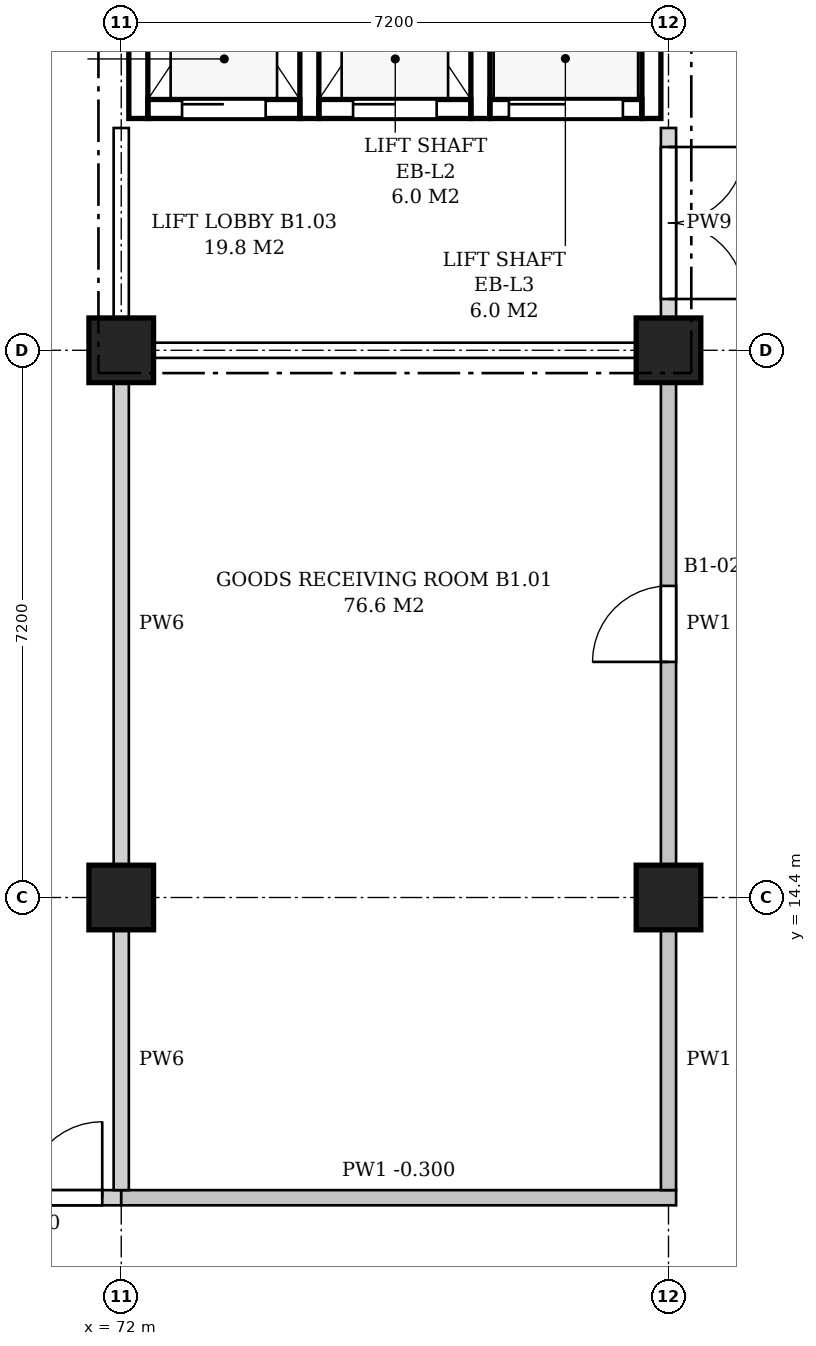
"""IFC4 building model, lengths in metres.
Left out: names, types, materials, properties, quantities, classifications, styles, units other than length and angle.
Written with IfcOpenShell. Run it as: python <this file> out.ifc"""

import sys

from ifc_helpers import new_model, si_unit, direction, frame, frame_2d, origin, origin_2d, place, context, subcontext, project, spatial, polyline, rectangle, outline, extrude, element, fill, save


model = new_model("IFC4")
c1 = context("Model", 3, precision=1e-05, world=origin(), true_north=direction((0.0, 1.0)))
c2 = subcontext(c1, "Body", "Model", "MODEL_VIEW")
j1 = project(units=[si_unit("LENGTHUNIT", "METRE"), si_unit("PLANEANGLEUNIT", "RADIAN")], contexts=[c1])
p1 = place(None, origin())
s1 = spatial("IfcSite", under=j1, at=p1, CompositionType="ELEMENT")
p2 = place(p1, origin())
s2 = spatial("IfcBuilding", under=s1, at=p2, CompositionType="ELEMENT")
p3 = place(p2, frame((0.0, 0.0, -4.5)))
s3 = spatial("IfcBuildingStorey", under=s2, at=p3, CompositionType="ELEMENT", Elevation=-4.5)
for number, where, z_axis, x_axis in (
    (1, (72.0, 14.4, 0.0), (0.0, 0.0, 1.0), (1.0, 0.0, 0.0)),
    (2, (72.0, 21.6, 0.0), (0.0, 0.0, 1.0), (1.0, 0.0, 0.0)),
    (3, (79.2, 14.4, 0.0), (0.0, 0.0, 1.0), (1.0, 0.0, 0.0)),
    (4, (79.2, 21.6, 0.0), (0.0, 0.0, 1.0), (1.0, 0.0, 0.0)),
):
    element("IfcColumn", number, at=place(p3, frame(where, z_axis=z_axis, x_axis=x_axis)), inside=s3, PredefinedType="COLUMN", context=c2, shape_type="SweptSolid", body=[
        extrude(rectangle(XDim=0.85, YDim=0.85, at=origin_2d()), origin(), (0.0, 0.0, 1.0), 4.5),
    ])
p4 = place(p3, frame((72.225, 24.65, -1.6), z_axis=(0.0, 0.0, 1.0), x_axis=(0.0, 1.0, 0.0)))
e5 = element("IfcWall", 5, at=p4, inside=s3, PredefinedType="SHEAR", context=c2, shape_type="SweptSolid", body=[
    extrude(rectangle(XDim=3.725, YDim=0.25, at=frame_2d((1.863, 0.0))), origin(), (0.0, 0.0, 1.0), 5.0),
])
for number, where, z_axis, x_axis in (
    (6, (74.475, 24.65, -1.6), (0.0, 0.0, 1.0), (0.0, 1.0, 0.0)),
    (7, (76.725, 24.65, -1.6), (0.0, 0.0, 1.0), (0.0, 1.0, 0.0)),
):
    element("IfcWall", number, at=place(p3, frame(where, z_axis=z_axis, x_axis=x_axis)), inside=s3, PredefinedType="SHEAR", context=c2, shape_type="SweptSolid", body=[
        extrude(rectangle(XDim=3.5, YDim=0.25, at=frame_2d((1.75, 0.0))), origin(), (0.0, 0.0, 1.0), 5.8),
    ])
p5 = place(p3, frame((78.975, 24.65, -1.6), z_axis=(0.0, 0.0, 1.0), x_axis=(0.0, 1.0, 0.0)))
e8 = element("IfcWall", 8, at=p5, inside=s3, PredefinedType="SHEAR", context=c2, shape_type="SweptSolid", body=[
    extrude(rectangle(XDim=3.725, YDim=0.25, at=frame_2d((1.863, 0.0))), origin(), (0.0, 0.0, 1.0), 5.0),
])
p6 = place(p3, frame((72.35, 24.775, 0.0), z_axis=(0.0, 0.0, 1.0), x_axis=(1.0, 0.0, 0.0)))
e9 = element("IfcWall", 9, at=p6, inside=s3, PredefinedType="SHEAR", context=c2, shape_type="SweptSolid", body=[
    extrude(rectangle(XDim=2.0, YDim=0.25, at=frame_2d((1.0, 0.0))), origin(), (0.0, 0.0, 1.0), 4.2),
])
p7 = place(p6, frame((0.45, 0.0, 0.0)))
e10 = element("IfcOpeningElement", 10, at=p7, cuts=e9, PredefinedType="OPENING", context=c2, shape_type="SweptSolid", body=[
    extrude(rectangle(XDim=1.1, YDim=2.1, at=frame_2d((0.55, 1.05))), frame((0.0, 0.135, 0.0), z_axis=(0.0, -1.0, 0.0), x_axis=(1.0, 0.0, 0.0)), (0.0, 0.0, 1.0), 0.27),
])
p8 = place(p3, frame((74.6, 24.775, 0.0), z_axis=(0.0, 0.0, 1.0), x_axis=(1.0, 0.0, 0.0)))
e11 = element("IfcWall", 11, at=p8, inside=s3, PredefinedType="SHEAR", context=c2, shape_type="SweptSolid", body=[
    extrude(rectangle(XDim=2.0, YDim=0.25, at=frame_2d((1.0, 0.0))), origin(), (0.0, 0.0, 1.0), 4.2),
])
p9 = place(p8, frame((0.45, 0.0, 0.0)))
e12 = element("IfcOpeningElement", 12, at=p9, cuts=e11, PredefinedType="OPENING", context=c2, shape_type="SweptSolid", body=[
    extrude(rectangle(XDim=1.1, YDim=2.1, at=frame_2d((0.55, 1.05))), frame((0.0, 0.135, 0.0), z_axis=(0.0, -1.0, 0.0), x_axis=(1.0, 0.0, 0.0)), (0.0, 0.0, 1.0), 0.27),
])
p10 = place(p3, frame((76.85, 24.775, 0.0), z_axis=(0.0, 0.0, 1.0), x_axis=(1.0, 0.0, 0.0)))
e13 = element("IfcWall", 13, at=p10, inside=s3, PredefinedType="SHEAR", context=c2, shape_type="SweptSolid", body=[
    extrude(rectangle(XDim=2.0, YDim=0.25, at=frame_2d((1.0, 0.0))), origin(), (0.0, 0.0, 1.0), 4.2),
])
p11 = place(p10, frame((0.25, 0.0, 0.0)))
e14 = element("IfcOpeningElement", 14, at=p11, cuts=e13, PredefinedType="OPENING", context=c2, shape_type="SweptSolid", body=[
    extrude(rectangle(XDim=1.5, YDim=2.1, at=frame_2d((0.75, 1.05))), frame((0.0, 0.135, 0.0), z_axis=(0.0, -1.0, 0.0), x_axis=(1.0, 0.0, 0.0)), (0.0, 0.0, 1.0), 0.27),
])
p12 = place(p3, frame((64.8, 10.45, 0.0), z_axis=(0.0, 0.0, 1.0), x_axis=(1.0, 0.0, 0.0)))
e15 = element("IfcWall", 15, at=p12, inside=s3, PredefinedType="PARTITIONING", context=c2, shape_type="SweptSolid", body=[
    extrude(outline(polyline([(0.0, 0.0), (7.2, 0.0), (7.2, 3.4), (6.9, 3.4), (6.9, 4.2), (0.3, 4.2), (0.3, 3.4), (0.0, 3.4), (0.0, 0.0)])), frame((0.0, 0.1, 0.0), z_axis=(0.0, -1.0, 0.0), x_axis=(1.0, 0.0, 0.0)), (0.0, 0.0, 1.0), 0.2),
])
p13 = place(p12, frame((2.6, 0.0, 0.0)))
e16 = element("IfcOpeningElement", 16, at=p13, cuts=e15, PredefinedType="OPENING", context=c2, shape_type="SweptSolid", body=[
    extrude(rectangle(XDim=2.0, YDim=2.1, at=frame_2d((1.0, 1.05))), frame((0.0, 0.11, 0.0), z_axis=(0.0, -1.0, 0.0), x_axis=(1.0, 0.0, 0.0)), (0.0, 0.0, 1.0), 0.22),
])
p14 = place(p12, frame((4.95, 0.0, 0.0)))
e17 = element("IfcOpeningElement", 17, at=p14, cuts=e15, PredefinedType="OPENING", context=c2, shape_type="SweptSolid", body=[
    extrude(rectangle(XDim=2.0, YDim=2.1, at=frame_2d((1.0, 1.05))), frame((0.0, 0.11, 0.0), z_axis=(0.0, -1.0, 0.0), x_axis=(1.0, 0.0, 0.0)), (0.0, 0.0, 1.0), 0.22),
])
p15 = place(p3, frame((72.0, 10.45, 0.0), z_axis=(0.0, 0.0, 1.0), x_axis=(1.0, 0.0, 0.0)))
e18 = element("IfcWall", 18, at=p15, inside=s3, PredefinedType="PARTITIONING", context=c2, shape_type="SweptSolid", body=[
    extrude(outline(polyline([(0.0, 0.0), (7.3, 0.0), (7.3, 3.4), (6.9, 3.4), (6.9, 4.2), (0.3, 4.2), (0.3, 3.4), (0.0, 3.4), (0.0, 0.0)])), frame((0.0, 0.1, 0.0), z_axis=(0.0, -1.0, 0.0), x_axis=(1.0, 0.0, 0.0)), (0.0, 0.0, 1.0), 0.2),
])
p16 = place(p3, frame((72.425, 21.6, 0.0), z_axis=(0.0, 0.0, 1.0), x_axis=(1.0, 0.0, 0.0)))
e19 = element("IfcWall", 19, at=p16, inside=s3, PredefinedType="PARTITIONING", context=c2, shape_type="SweptSolid", body=[
    extrude(rectangle(XDim=6.35, YDim=0.2, at=frame_2d((3.175, 0.0))), origin(), (0.0, 0.0, 1.0), 3.4),
])
p17 = place(p3, frame((72.0, 10.55, 0.0), z_axis=(0.0, 0.0, 1.0), x_axis=(0.0, 1.0, 0.0)))
e20 = element("IfcWall", 20, at=p17, inside=s3, PredefinedType="PARTITIONING", context=c2, shape_type="SweptSolid", body=[
    extrude(rectangle(XDim=3.425, YDim=0.2, at=frame_2d((1.712, 0.0))), origin(), (0.0, 0.0, 1.0), 3.4),
])
p18 = place(p3, frame((72.0, 14.825, 0.0), z_axis=(0.0, 0.0, 1.0), x_axis=(0.0, 1.0, 0.0)))
e21 = element("IfcWall", 21, at=p18, inside=s3, PredefinedType="PARTITIONING", context=c2, shape_type="SweptSolid", body=[
    extrude(rectangle(XDim=6.35, YDim=0.2, at=frame_2d((3.175, 0.0))), origin(), (0.0, 0.0, 1.0), 3.4),
])
p19 = place(p3, frame((72.0, 22.025, 0.0), z_axis=(0.0, 0.0, 1.0), x_axis=(0.0, 1.0, 0.0)))
e22 = element("IfcWall", 22, at=p19, inside=s3, PredefinedType="PARTITIONING", context=c2, shape_type="SweptSolid", body=[
    extrude(rectangle(XDim=2.5, YDim=0.2, at=frame_2d((1.25, 0.0))), origin(), (0.0, 0.0, 1.0), 3.4),
])
p20 = place(p3, frame((79.2, 10.55, 0.0), z_axis=(0.0, 0.0, 1.0), x_axis=(0.0, 1.0, 0.0)))
e23 = element("IfcWall", 23, at=p20, inside=s3, PredefinedType="PARTITIONING", context=c2, shape_type="SweptSolid", body=[
    extrude(rectangle(XDim=3.425, YDim=0.2, at=frame_2d((1.712, 0.0))), origin(), (0.0, 0.0, 1.0), 3.4),
])
p21 = place(p3, frame((79.2, 14.825, 0.0), z_axis=(0.0, 0.0, 1.0), x_axis=(0.0, 1.0, 0.0)))
e24 = element("IfcWall", 24, at=p21, inside=s3, PredefinedType="PARTITIONING", context=c2, shape_type="SweptSolid", body=[
    extrude(rectangle(XDim=6.35, YDim=0.2, at=frame_2d((3.175, 0.0))), origin(), (0.0, 0.0, 1.0), 3.4),
])
p22 = place(p21, frame((2.675, 0.0, 0.0)))
e25 = element("IfcOpeningElement", 25, at=p22, cuts=e24, PredefinedType="OPENING", context=c2, shape_type="SweptSolid", body=[
    extrude(rectangle(XDim=1.0, YDim=2.1, at=frame_2d((0.5, 1.05))), frame((0.0, 0.11, 0.0), z_axis=(0.0, -1.0, 0.0), x_axis=(1.0, 0.0, 0.0)), (0.0, 0.0, 1.0), 0.22),
])
p23 = place(p3, frame((79.2, 22.025, 0.0), z_axis=(0.0, 0.0, 1.0), x_axis=(0.0, 1.0, 0.0)))
e26 = element("IfcWall", 26, at=p23, inside=s3, PredefinedType="PARTITIONING", context=c2, shape_type="SweptSolid", body=[
    extrude(rectangle(XDim=2.5, YDim=0.2, at=frame_2d((1.25, 0.0))), origin(), (0.0, 0.0, 1.0), 3.4),
])
p24 = place(p23, frame((0.25, 0.0, 0.0)))
e27 = element("IfcOpeningElement", 27, at=p24, cuts=e26, PredefinedType="OPENING", context=c2, shape_type="SweptSolid", body=[
    extrude(rectangle(XDim=2.0, YDim=2.4, at=frame_2d((1.0, 1.2))), frame((0.0, 0.11, 0.0), z_axis=(0.0, -1.0, 0.0), x_axis=(1.0, 0.0, 0.0)), (0.0, 0.0, 1.0), 0.22),
])
p25 = place(p7, origin())
e28 = element("IfcDoor", 28, at=p25, inside=s3, OperationType="SLIDING_TO_LEFT", PredefinedType="DOOR", context=c2, shape_type="SweptSolid", body=[
    extrude(rectangle(XDim=1.1, YDim=2.1, at=frame_2d((0.55, 1.05))), frame((0.0, 0.025, 0.0), z_axis=(0.0, -1.0, 0.0), x_axis=(1.0, 0.0, 0.0)), (0.0, 0.0, 1.0), 0.05),
])
fill(e10, e28)
p26 = place(p9, origin())
e29 = element("IfcDoor", 29, at=p26, inside=s3, OperationType="SLIDING_TO_LEFT", PredefinedType="DOOR", context=c2, shape_type="SweptSolid", body=[
    extrude(rectangle(XDim=1.1, YDim=2.1, at=frame_2d((0.55, 1.05))), frame((0.0, 0.025, 0.0), z_axis=(0.0, -1.0, 0.0), x_axis=(1.0, 0.0, 0.0)), (0.0, 0.0, 1.0), 0.05),
])
fill(e12, e29)
p27 = place(p11, origin())
e30 = element("IfcDoor", 30, at=p27, inside=s3, OperationType="SLIDING_TO_LEFT", PredefinedType="DOOR", context=c2, shape_type="SweptSolid", body=[
    extrude(rectangle(XDim=1.5, YDim=2.1, at=frame_2d((0.75, 1.05))), frame((0.0, 0.025, 0.0), z_axis=(0.0, -1.0, 0.0), x_axis=(1.0, 0.0, 0.0)), (0.0, 0.0, 1.0), 0.05),
])
fill(e14, e30)
p28 = place(p24, origin())
e31 = element("IfcDoor", 31, at=p28, inside=s3, OperationType="DOUBLE_DOOR_SINGLE_SWING", PredefinedType="DOOR", context=c2, shape_type="SweptSolid", body=[
    extrude(rectangle(XDim=2.0, YDim=2.4, at=frame_2d((1.0, 1.2))), frame((0.0, 0.025, 0.0), z_axis=(0.0, -1.0, 0.0), x_axis=(1.0, 0.0, 0.0)), (0.0, 0.0, 1.0), 0.05),
])
fill(e27, e31)
p29 = place(p14, origin())
e32 = element("IfcDoor", 32, at=p29, inside=s3, OperationType="DOUBLE_DOOR_SINGLE_SWING", PredefinedType="DOOR", context=c2, shape_type="SweptSolid", body=[
    extrude(rectangle(XDim=2.0, YDim=2.1, at=frame_2d((1.0, 1.05))), frame((0.0, 0.025, 0.0), z_axis=(0.0, -1.0, 0.0), x_axis=(1.0, 0.0, 0.0)), (0.0, 0.0, 1.0), 0.05),
])
fill(e17, e32)
p30 = place(p22, origin())
e33 = element("IfcDoor", 33, at=p30, inside=s3, OperationType="SINGLE_SWING_LEFT", PredefinedType="DOOR", context=c2, shape_type="SweptSolid", body=[
    extrude(rectangle(XDim=1.0, YDim=2.1, at=frame_2d((0.5, 1.05))), frame((0.0, 0.025, 0.0), z_axis=(0.0, -1.0, 0.0), x_axis=(1.0, 0.0, 0.0)), (0.0, 0.0, 1.0), 0.05),
])
fill(e25, e33)
save(model, sys.argv[1])
